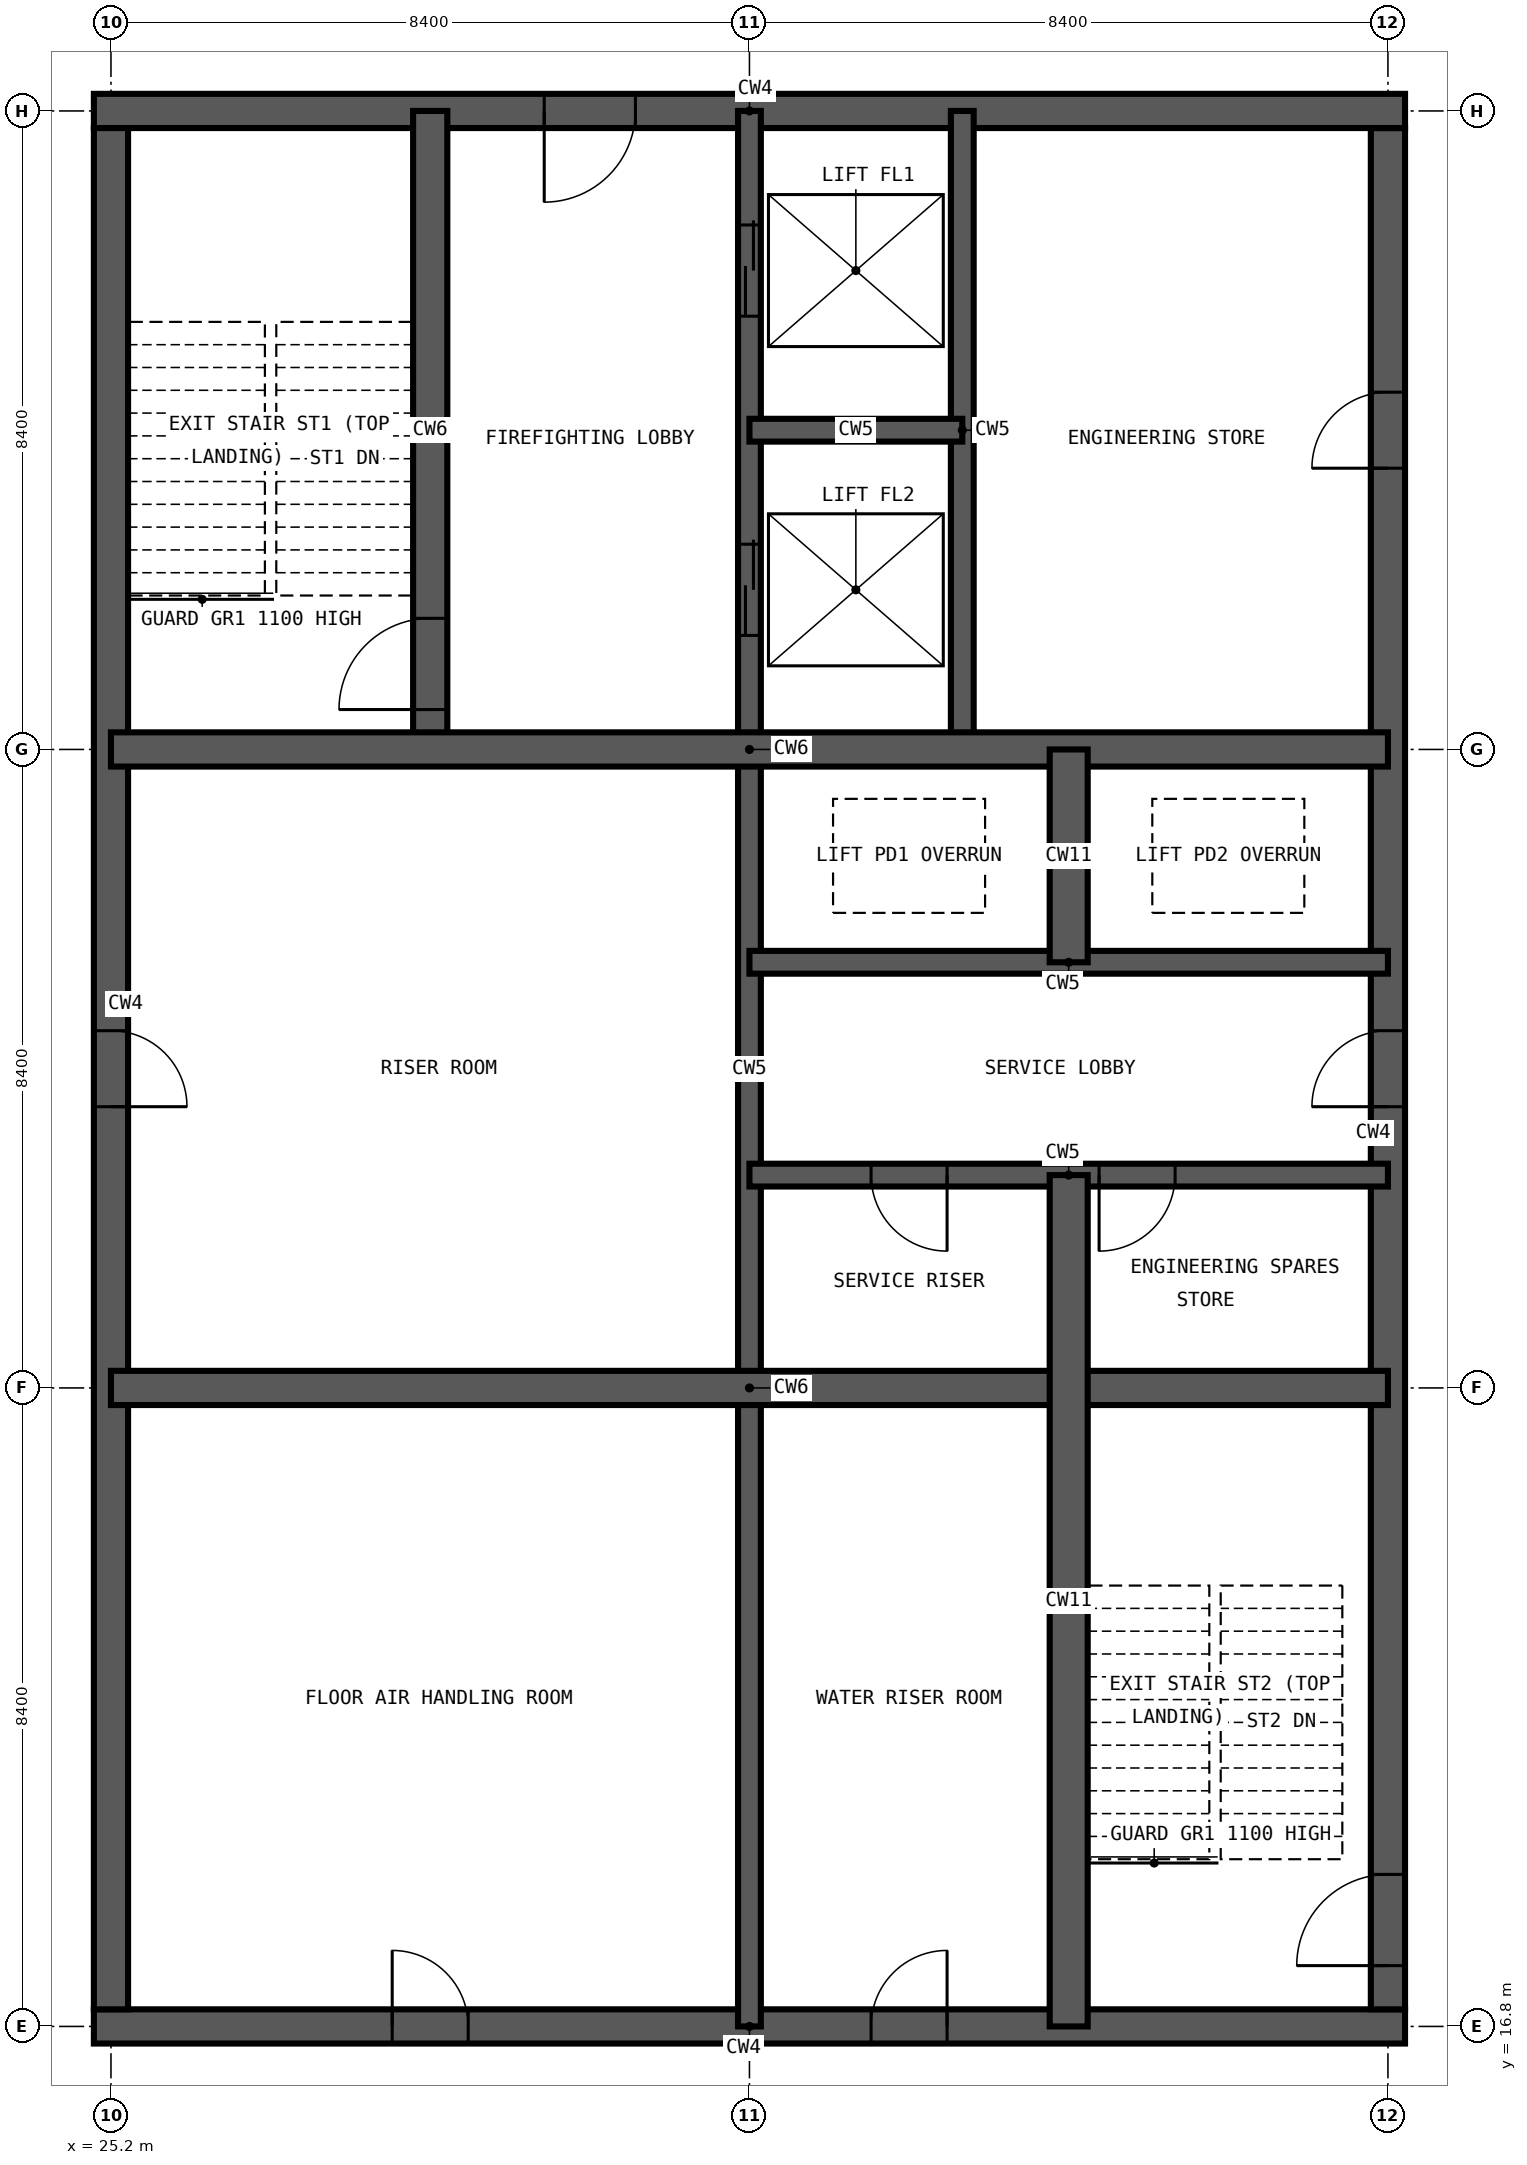
"""IFC4 building model, lengths in metres.
Left out: names, types, materials, properties, quantities, classifications, styles, units other than length and angle.
Written with IfcOpenShell. Run it as: python <this file> out.ifc"""

import sys

from ifc_helpers import new_model, si_unit, direction, frame, frame_2d, origin, place, context, subcontext, project, spatial, polyline, rectangle, outline, extrude, element, fill, save


model = new_model("IFC4")
c1 = context("Model", 3, precision=1e-05, world=origin(), true_north=direction((0.0, 1.0)))
c2 = subcontext(c1, "Body", "Model", "MODEL_VIEW")
j1 = project(units=[si_unit("LENGTHUNIT", "METRE"), si_unit("PLANEANGLEUNIT", "RADIAN")], contexts=[c1])
p1 = place(None, origin())
s1 = spatial("IfcSite", under=j1, at=p1, CompositionType="ELEMENT")
p2 = place(p1, origin())
s2 = spatial("IfcBuilding", under=s1, at=p2, CompositionType="ELEMENT")
p3 = place(p2, frame((0.0, 0.0, 293.6)))
s3 = spatial("IfcBuildingStorey", under=s2, at=p3, CompositionType="ELEMENT", Elevation=293.6)
p4 = place(p3, frame((24.975, 16.8, -0.35), z_axis=(0.0, 0.0, 1.0), x_axis=(1.0, 0.0, 0.0)))
e1 = element("IfcWall", 1, at=p4, inside=s3, PredefinedType="SHEAR", context=c2, shape_type="SweptSolid", body=[
    extrude(outline(polyline([(0.0, 0.0), (17.25, 0.0), (17.25, 12.529), (0.0, 7.907), (0.0, 0.0)])), frame((0.0, 0.225, 0.0), z_axis=(0.0, -1.0, 0.0), x_axis=(1.0, 0.0, 0.0)), (0.0, 0.0, 1.0), 0.45),
])
p5 = place(p4, frame((3.925, 0.0, 0.35)))
e2 = element("IfcOpeningElement", 2, at=p5, cuts=e1, PredefinedType="OPENING", context=c2, shape_type="SweptSolid", body=[
    extrude(rectangle(XDim=1.0, YDim=2.1, at=frame_2d((0.5, 1.05))), frame((0.0, 0.235, 0.0), z_axis=(0.0, -1.0, 0.0), x_axis=(1.0, 0.0, 0.0)), (0.0, 0.0, 1.0), 0.47),
])
p6 = place(p4, frame((10.225, 0.0, 0.35)))
e3 = element("IfcOpeningElement", 3, at=p6, cuts=e1, PredefinedType="OPENING", context=c2, shape_type="SweptSolid", body=[
    extrude(rectangle(XDim=1.0, YDim=2.1, at=frame_2d((0.5, 1.05))), frame((0.0, 0.235, 0.0), z_axis=(0.0, -1.0, 0.0), x_axis=(1.0, 0.0, 0.0)), (0.0, 0.0, 1.0), 0.47),
])
p7 = place(p3, frame((42.0, 17.025, -0.35), z_axis=(0.0, 0.0, 1.0), x_axis=(0.0, 1.0, 0.0)))
e4 = element("IfcWall", 4, at=p7, inside=s3, PredefinedType="SHEAR", context=c2, shape_type="SweptSolid", body=[
    extrude(outline(polyline([(0.0, 0.0), (24.75, 0.0), (24.75, 12.469), (0.0, 12.469), (0.0, 0.0)])), frame((0.0, 0.225, 0.0), z_axis=(0.0, -1.0, 0.0), x_axis=(1.0, 0.0, 0.0)), (0.0, 0.0, 1.0), 0.45),
])
p8 = place(p7, frame((0.575, 0.0, 0.35)))
e5 = element("IfcOpeningElement", 5, at=p8, cuts=e4, PredefinedType="OPENING", context=c2, shape_type="SweptSolid", body=[
    extrude(rectangle(XDim=1.2, YDim=2.2, at=frame_2d((0.6, 1.1))), frame((0.0, 0.235, 0.0), z_axis=(0.0, -1.0, 0.0), x_axis=(1.0, 0.0, 0.0)), (0.0, 0.0, 1.0), 0.47),
])
p9 = place(p7, frame((11.875, 0.0, 0.35)))
e6 = element("IfcOpeningElement", 6, at=p9, cuts=e4, PredefinedType="OPENING", context=c2, shape_type="SweptSolid", body=[
    extrude(rectangle(XDim=1.0, YDim=2.1, at=frame_2d((0.5, 1.05))), frame((0.0, 0.235, 0.0), z_axis=(0.0, -1.0, 0.0), x_axis=(1.0, 0.0, 0.0)), (0.0, 0.0, 1.0), 0.47),
])
p10 = place(p7, frame((20.275, 0.0, 0.35)))
e7 = element("IfcOpeningElement", 7, at=p10, cuts=e4, PredefinedType="OPENING", context=c2, shape_type="SweptSolid", body=[
    extrude(rectangle(XDim=1.0, YDim=2.1, at=frame_2d((0.5, 1.05))), frame((0.0, 0.235, 0.0), z_axis=(0.0, -1.0, 0.0), x_axis=(1.0, 0.0, 0.0)), (0.0, 0.0, 1.0), 0.47),
])
p11 = place(p3, frame((42.225, 42.0, -0.35), z_axis=(0.0, 0.0, 1.0), x_axis=(-1.0, 0.0, 0.0)))
e8 = element("IfcWall", 8, at=p11, inside=s3, PredefinedType="SHEAR", context=c2, shape_type="SweptSolid", body=[
    extrude(outline(polyline([(0.0, 0.0), (17.25, 0.0), (17.25, 7.907), (0.0, 12.529), (0.0, 0.0)])), frame((0.0, 0.225, 0.0), z_axis=(0.0, -1.0, 0.0), x_axis=(1.0, 0.0, 0.0)), (0.0, 0.0, 1.0), 0.45),
])
p12 = place(p11, frame((10.125, 0.0, 0.35)))
e9 = element("IfcOpeningElement", 9, at=p12, cuts=e8, PredefinedType="OPENING", context=c2, shape_type="SweptSolid", body=[
    extrude(rectangle(XDim=1.2, YDim=2.2, at=frame_2d((0.6, 1.1))), frame((0.0, 0.235, 0.0), z_axis=(0.0, -1.0, 0.0), x_axis=(1.0, 0.0, 0.0)), (0.0, 0.0, 1.0), 0.47),
])
p13 = place(p3, frame((25.2, 41.775, -0.35), z_axis=(0.0, 0.0, 1.0), x_axis=(0.0, -1.0, 0.0)))
e10 = element("IfcWall", 10, at=p13, inside=s3, PredefinedType="SHEAR", context=c2, shape_type="SweptSolid", body=[
    extrude(outline(polyline([(0.0, 0.0), (24.75, 0.0), (24.75, 7.967), (0.0, 7.967), (0.0, 0.0)])), frame((0.0, 0.225, 0.0), z_axis=(0.0, -1.0, 0.0), x_axis=(1.0, 0.0, 0.0)), (0.0, 0.0, 1.0), 0.45),
])
p14 = place(p13, frame((11.875, 0.0, 0.35)))
e11 = element("IfcOpeningElement", 11, at=p14, cuts=e10, PredefinedType="OPENING", context=c2, shape_type="SweptSolid", body=[
    extrude(rectangle(XDim=1.0, YDim=2.1, at=frame_2d((0.5, 1.05))), frame((0.0, 0.235, 0.0), z_axis=(0.0, -1.0, 0.0), x_axis=(1.0, 0.0, 0.0)), (0.0, 0.0, 1.0), 0.47),
])
p15 = place(p3, frame((33.6, 16.8, -0.35), z_axis=(0.0, 0.0, 1.0), x_axis=(0.0, 1.0, 0.0)))
e12 = element("IfcWall", 12, at=p15, inside=s3, PredefinedType="SHEAR", context=c2, shape_type="SweptSolid", body=[
    extrude(outline(polyline([(0.0, 0.0), (25.2, 0.0), (25.2, 10.218), (0.0, 10.218), (0.0, 0.0)])), frame((0.0, 0.15, 0.0), z_axis=(0.0, -1.0, 0.0), x_axis=(1.0, 0.0, 0.0)), (0.0, 0.0, 1.0), 0.3),
])
p16 = place(p15, frame((22.5, 0.0, 0.35)))
e13 = element("IfcOpeningElement", 13, at=p16, cuts=e12, PredefinedType="OPENING", context=c2, shape_type="SweptSolid", body=[
    extrude(rectangle(XDim=1.2, YDim=2.2, at=frame_2d((0.6, 1.1))), frame((0.0, 0.16, 0.0), z_axis=(0.0, -1.0, 0.0), x_axis=(1.0, 0.0, 0.0)), (0.0, 0.0, 1.0), 0.32),
])
p17 = place(p15, frame((18.3, 0.0, 0.35)))
e14 = element("IfcOpeningElement", 14, at=p17, cuts=e12, PredefinedType="OPENING", context=c2, shape_type="SweptSolid", body=[
    extrude(rectangle(XDim=1.2, YDim=2.2, at=frame_2d((0.6, 1.1))), frame((0.0, 0.16, 0.0), z_axis=(0.0, -1.0, 0.0), x_axis=(1.0, 0.0, 0.0)), (0.0, 0.0, 1.0), 0.32),
])
p18 = place(p3, frame((36.4, 33.6, -0.35), z_axis=(0.0, 0.0, 1.0), x_axis=(0.0, 1.0, 0.0)))
e15 = element("IfcWall", 15, at=p18, inside=s3, PredefinedType="SHEAR", context=c2, shape_type="SweptSolid", body=[
    extrude(outline(polyline([(0.0, 0.0), (8.4, 0.0), (8.4, 10.969), (0.0, 10.969), (0.0, 0.0)])), frame((0.0, 0.15, 0.0), z_axis=(0.0, -1.0, 0.0), x_axis=(1.0, 0.0, 0.0)), (0.0, 0.0, 1.0), 0.3),
])
p19 = place(p3, frame((33.6, 28.0, -0.35), z_axis=(0.0, 0.0, 1.0), x_axis=(1.0, 0.0, 0.0)))
e16 = element("IfcWall", 16, at=p19, inside=s3, PredefinedType="SHEAR", context=c2, shape_type="SweptSolid", body=[
    extrude(outline(polyline([(0.0, 0.0), (8.4, 0.0), (8.4, 12.469), (0.0, 10.218), (0.0, 0.0)])), frame((0.0, 0.15, 0.0), z_axis=(0.0, -1.0, 0.0), x_axis=(1.0, 0.0, 0.0)), (0.0, 0.0, 1.0), 0.3),
])
p20 = place(p19, frame((1.6, 0.0, 0.35)))
e17 = element("IfcOpeningElement", 17, at=p20, cuts=e16, PredefinedType="OPENING", context=c2, shape_type="SweptSolid", body=[
    extrude(rectangle(XDim=1.0, YDim=2.1, at=frame_2d((0.5, 1.05))), frame((0.0, 0.16, 0.0), z_axis=(0.0, -1.0, 0.0), x_axis=(1.0, 0.0, 0.0)), (0.0, 0.0, 1.0), 0.32),
])
p21 = place(p19, frame((4.6, 0.0, 0.35)))
e18 = element("IfcOpeningElement", 18, at=p21, cuts=e16, PredefinedType="OPENING", context=c2, shape_type="SweptSolid", body=[
    extrude(rectangle(XDim=1.0, YDim=2.1, at=frame_2d((0.5, 1.05))), frame((0.0, 0.16, 0.0), z_axis=(0.0, -1.0, 0.0), x_axis=(1.0, 0.0, 0.0)), (0.0, 0.0, 1.0), 0.32),
])
p22 = place(p3, frame((33.6, 30.8, -0.35), z_axis=(0.0, 0.0, 1.0), x_axis=(1.0, 0.0, 0.0)))
e19 = element("IfcWall", 19, at=p22, inside=s3, PredefinedType="SHEAR", context=c2, shape_type="SweptSolid", body=[
    extrude(outline(polyline([(0.0, 0.0), (8.4, 0.0), (8.4, 12.469), (0.0, 10.218), (0.0, 0.0)])), frame((0.0, 0.15, 0.0), z_axis=(0.0, -1.0, 0.0), x_axis=(1.0, 0.0, 0.0)), (0.0, 0.0, 1.0), 0.3),
])
p23 = place(p3, frame((33.6, 37.8, -0.35), z_axis=(0.0, 0.0, 1.0), x_axis=(1.0, 0.0, 0.0)))
e20 = element("IfcWall", 20, at=p23, inside=s3, PredefinedType="SHEAR", context=c2, shape_type="SweptSolid", body=[
    extrude(outline(polyline([(0.0, 0.0), (2.8, 0.0), (2.8, 10.969), (0.0, 10.218), (0.0, 0.0)])), frame((0.0, 0.15, 0.0), z_axis=(0.0, -1.0, 0.0), x_axis=(1.0, 0.0, 0.0)), (0.0, 0.0, 1.0), 0.3),
])
p24 = place(p3, frame((29.4, 33.6, -0.35), z_axis=(0.0, 0.0, 1.0), x_axis=(0.0, 1.0, 0.0)))
e21 = element("IfcWall", 21, at=p24, inside=s3, PredefinedType="SHEAR", context=c2, shape_type="SweptSolid", body=[
    extrude(outline(polyline([(0.0, 0.0), (8.4, 0.0), (8.4, 9.093), (0.0, 9.093), (0.0, 0.0)])), frame((0.0, 0.225, 0.0), z_axis=(0.0, -1.0, 0.0), x_axis=(1.0, 0.0, 0.0)), (0.0, 0.0, 1.0), 0.45),
])
p25 = place(p24, frame((0.525, 0.0, 0.35)))
e22 = element("IfcOpeningElement", 22, at=p25, cuts=e21, PredefinedType="OPENING", context=c2, shape_type="SweptSolid", body=[
    extrude(rectangle(XDim=1.2, YDim=2.2, at=frame_2d((0.6, 1.1))), frame((0.0, 0.235, 0.0), z_axis=(0.0, -1.0, 0.0), x_axis=(1.0, 0.0, 0.0)), (0.0, 0.0, 1.0), 0.47),
])
for number, where, z_axis, x_axis in (
    (23, (25.2, 25.2, -0.35), (0.0, 0.0, 1.0), (1.0, 0.0, 0.0)),
    (24, (25.2, 33.6, -0.35), (0.0, 0.0, 1.0), (1.0, 0.0, 0.0)),
):
    element("IfcWall", number, at=place(p3, frame(where, z_axis=z_axis, x_axis=x_axis)), inside=s3, PredefinedType="SHEAR", context=c2, shape_type="SweptSolid", body=[
        extrude(outline(polyline([(0.0, 0.0), (16.8, 0.0), (16.8, 12.469), (0.0, 7.967), (0.0, 0.0)])), frame((0.0, 0.225, 0.0), z_axis=(0.0, -1.0, 0.0), x_axis=(1.0, 0.0, 0.0)), (0.0, 0.0, 1.0), 0.45),
    ])
p26 = place(p3, frame((37.8, 16.8, -0.35), z_axis=(0.0, 0.0, 1.0), x_axis=(0.0, 1.0, 0.0)))
e25 = element("IfcWall", 25, at=p26, inside=s3, PredefinedType="SHEAR", context=c2, shape_type="SweptSolid", body=[
    extrude(outline(polyline([(0.0, 0.0), (11.2, 0.0), (11.2, 11.344), (0.0, 11.344), (0.0, 0.0)])), frame((0.0, 0.25, 0.0), z_axis=(0.0, -1.0, 0.0), x_axis=(1.0, 0.0, 0.0)), (0.0, 0.0, 1.0), 0.5),
])
p27 = place(p3, frame((37.8, 30.8, -0.35), z_axis=(0.0, 0.0, 1.0), x_axis=(0.0, 1.0, 0.0)))
e26 = element("IfcWall", 26, at=p27, inside=s3, PredefinedType="SHEAR", context=c2, shape_type="SweptSolid", body=[
    extrude(outline(polyline([(0.0, 0.0), (2.8, 0.0), (2.8, 11.344), (0.0, 11.344), (0.0, 0.0)])), frame((0.0, 0.25, 0.0), z_axis=(0.0, -1.0, 0.0), x_axis=(1.0, 0.0, 0.0)), (0.0, 0.0, 1.0), 0.5),
])
p28 = place(p25, origin())
e27 = element("IfcDoor", 27, at=p28, inside=s3, OperationType="SINGLE_SWING_LEFT", PredefinedType="DOOR", context=c2, shape_type="SweptSolid", body=[
    extrude(rectangle(XDim=1.2, YDim=2.2, at=frame_2d((0.6, 1.1))), frame((0.0, 0.025, 0.0), z_axis=(0.0, -1.0, 0.0), x_axis=(1.0, 0.0, 0.0)), (0.0, 0.0, 1.0), 0.05),
])
fill(e22, e27)
p29 = place(p8, origin())
e28 = element("IfcDoor", 28, at=p29, inside=s3, OperationType="SINGLE_SWING_LEFT", PredefinedType="DOOR", context=c2, shape_type="SweptSolid", body=[
    extrude(rectangle(XDim=1.2, YDim=2.2, at=frame_2d((0.6, 1.1))), frame((0.0, 0.025, 0.0), z_axis=(0.0, -1.0, 0.0), x_axis=(1.0, 0.0, 0.0)), (0.0, 0.0, 1.0), 0.05),
])
fill(e5, e28)
p30 = place(p16, origin())
e29 = element("IfcDoor", 29, at=p30, inside=s3, OperationType="DOUBLE_DOOR_SLIDING", PredefinedType="DOOR", context=c2, shape_type="SweptSolid", body=[
    extrude(rectangle(XDim=1.2, YDim=2.2, at=frame_2d((0.6, 1.1))), frame((0.0, 0.025, 0.0), z_axis=(0.0, -1.0, 0.0), x_axis=(1.0, 0.0, 0.0)), (0.0, 0.0, 1.0), 0.05),
])
fill(e13, e29)
p31 = place(p17, origin())
e30 = element("IfcDoor", 30, at=p31, inside=s3, OperationType="DOUBLE_DOOR_SLIDING", PredefinedType="DOOR", context=c2, shape_type="SweptSolid", body=[
    extrude(rectangle(XDim=1.2, YDim=2.2, at=frame_2d((0.6, 1.1))), frame((0.0, 0.025, 0.0), z_axis=(0.0, -1.0, 0.0), x_axis=(1.0, 0.0, 0.0)), (0.0, 0.0, 1.0), 0.05),
])
fill(e14, e30)
p32 = place(p14, origin())
e31 = element("IfcDoor", 31, at=p32, inside=s3, OperationType="SINGLE_SWING_RIGHT", PredefinedType="DOOR", context=c2, shape_type="SweptSolid", body=[
    extrude(rectangle(XDim=1.0, YDim=2.1, at=frame_2d((0.5, 1.05))), frame((0.0, 0.025, 0.0), z_axis=(0.0, -1.0, 0.0), x_axis=(1.0, 0.0, 0.0)), (0.0, 0.0, 1.0), 0.05),
])
fill(e11, e31)
p33 = place(p20, frame((1.0, 0.0, 0.0), z_axis=(0.0, 0.0, 1.0), x_axis=(-1.0, 0.0, 0.0)))
e32 = element("IfcDoor", 32, at=p33, inside=s3, OperationType="SINGLE_SWING_LEFT", PredefinedType="DOOR", context=c2, shape_type="SweptSolid", body=[
    extrude(rectangle(XDim=1.0, YDim=2.1, at=frame_2d((0.5, 1.05))), frame((0.0, 0.025, 0.0), z_axis=(0.0, -1.0, 0.0), x_axis=(1.0, 0.0, 0.0)), (0.0, 0.0, 1.0), 0.05),
])
fill(e17, e32)
p34 = place(p21, frame((1.0, 0.0, 0.0), z_axis=(0.0, 0.0, 1.0), x_axis=(-1.0, 0.0, 0.0)))
e33 = element("IfcDoor", 33, at=p34, inside=s3, OperationType="SINGLE_SWING_RIGHT", PredefinedType="DOOR", context=c2, shape_type="SweptSolid", body=[
    extrude(rectangle(XDim=1.0, YDim=2.1, at=frame_2d((0.5, 1.05))), frame((0.0, 0.025, 0.0), z_axis=(0.0, -1.0, 0.0), x_axis=(1.0, 0.0, 0.0)), (0.0, 0.0, 1.0), 0.05),
])
fill(e18, e33)
p35 = place(p9, origin())
e34 = element("IfcDoor", 34, at=p35, inside=s3, OperationType="SINGLE_SWING_LEFT", PredefinedType="DOOR", context=c2, shape_type="SweptSolid", body=[
    extrude(rectangle(XDim=1.0, YDim=2.1, at=frame_2d((0.5, 1.05))), frame((0.0, 0.025, 0.0), z_axis=(0.0, -1.0, 0.0), x_axis=(1.0, 0.0, 0.0)), (0.0, 0.0, 1.0), 0.05),
])
fill(e6, e34)
p36 = place(p12, origin())
e35 = element("IfcDoor", 35, at=p36, inside=s3, OperationType="SINGLE_SWING_RIGHT", PredefinedType="DOOR", context=c2, shape_type="SweptSolid", body=[
    extrude(rectangle(XDim=1.2, YDim=2.2, at=frame_2d((0.6, 1.1))), frame((0.0, 0.025, 0.0), z_axis=(0.0, -1.0, 0.0), x_axis=(1.0, 0.0, 0.0)), (0.0, 0.0, 1.0), 0.05),
])
fill(e9, e35)
p37 = place(p10, origin())
e36 = element("IfcDoor", 36, at=p37, inside=s3, OperationType="SINGLE_SWING_LEFT", PredefinedType="DOOR", context=c2, shape_type="SweptSolid", body=[
    extrude(rectangle(XDim=1.0, YDim=2.1, at=frame_2d((0.5, 1.05))), frame((0.0, 0.025, 0.0), z_axis=(0.0, -1.0, 0.0), x_axis=(1.0, 0.0, 0.0)), (0.0, 0.0, 1.0), 0.05),
])
fill(e7, e36)
p38 = place(p5, origin())
e37 = element("IfcDoor", 37, at=p38, inside=s3, OperationType="SINGLE_SWING_LEFT", PredefinedType="DOOR", context=c2, shape_type="SweptSolid", body=[
    extrude(rectangle(XDim=1.0, YDim=2.1, at=frame_2d((0.5, 1.05))), frame((0.0, 0.025, 0.0), z_axis=(0.0, -1.0, 0.0), x_axis=(1.0, 0.0, 0.0)), (0.0, 0.0, 1.0), 0.05),
])
fill(e2, e37)
p39 = place(p6, origin())
e38 = element("IfcDoor", 38, at=p39, inside=s3, OperationType="SINGLE_SWING_RIGHT", PredefinedType="DOOR", context=c2, shape_type="SweptSolid", body=[
    extrude(rectangle(XDim=1.0, YDim=2.1, at=frame_2d((0.5, 1.05))), frame((0.0, 0.025, 0.0), z_axis=(0.0, -1.0, 0.0), x_axis=(1.0, 0.0, 0.0)), (0.0, 0.0, 1.0), 0.05),
])
fill(e3, e38)
save(model, sys.argv[1])
